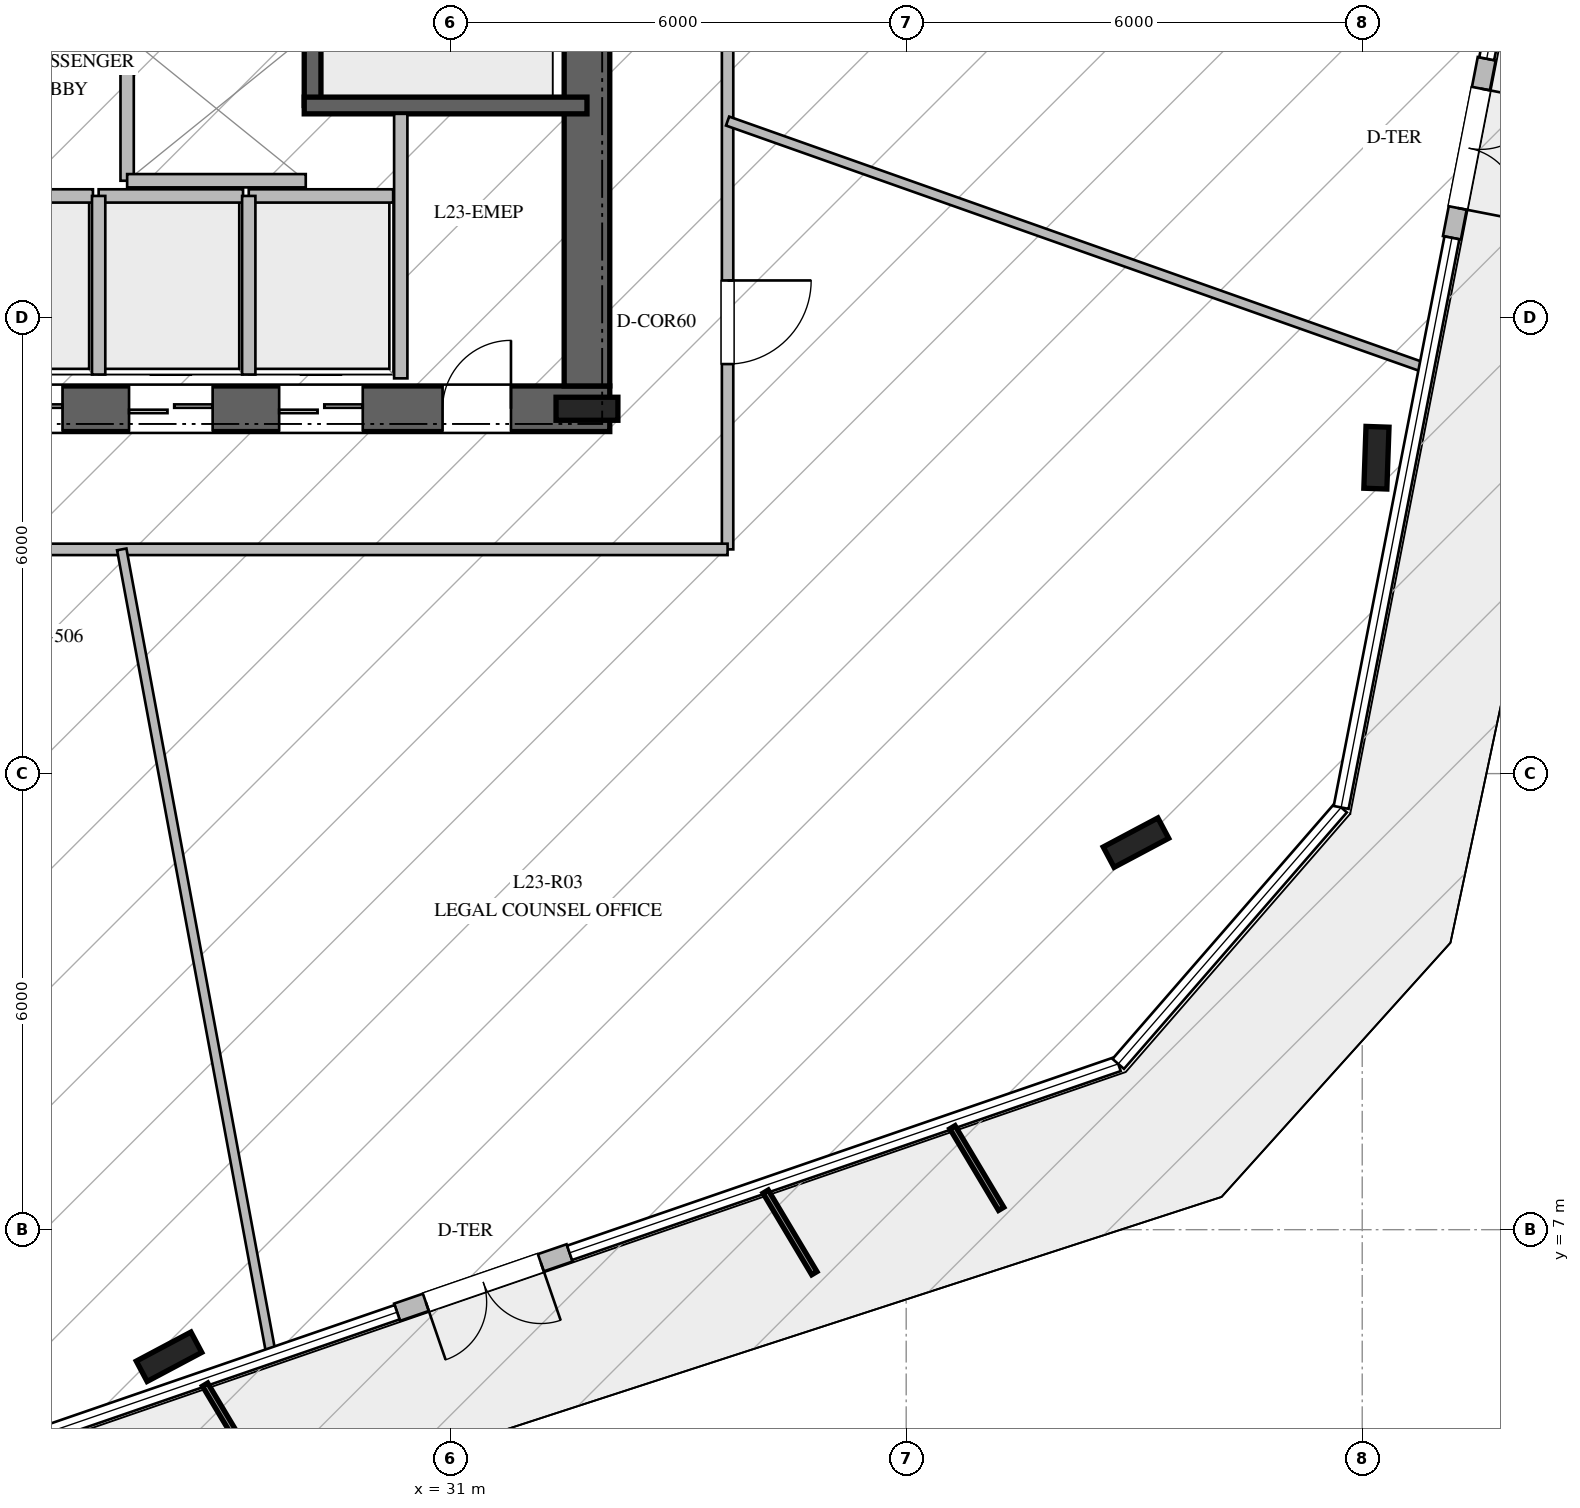
"""IFC4 building model, lengths in metres.
Left out: names, types, materials, properties, quantities, classifications, styles, units other than length and angle.
Written with IfcOpenShell. Run it as: python <this file> out.ifc"""

import sys

from ifc_helpers import new_model, si_unit, direction, frame, frame_2d, origin, origin_2d, place, context, subcontext, project, spatial, rectangle, i_section, extrude, element, fill, save


model = new_model("IFC4")
c1 = context("Model", 3, precision=1e-05, world=origin(), true_north=direction((0.0, 1.0)))
c2 = subcontext(c1, "Body", "Model", "MODEL_VIEW")
j1 = project(units=[si_unit("LENGTHUNIT", "METRE"), si_unit("PLANEANGLEUNIT", "RADIAN")], contexts=[c1])
p1 = place(None, origin())
s1 = spatial("IfcSite", under=j1, at=p1, CompositionType="ELEMENT")
p2 = place(p1, origin())
s2 = spatial("IfcBuilding", under=s1, at=p2, CompositionType="ELEMENT")
p3 = place(p2, frame((0.0, 0.0, 97.4)))
s3 = spatial("IfcBuildingStorey", under=s2, at=p3, CompositionType="ELEMENT", Elevation=97.4)
p4 = place(p3, frame((16.9, 17.8, 0.0), z_axis=(0.0, 0.0, 1.0), x_axis=(1.0, 0.0, 0.0)))
e1 = element("IfcWall", 1, at=p4, inside=s3, PredefinedType="SHEAR", context=c2, shape_type="SweptSolid", body=[
    extrude(rectangle(XDim=16.2, YDim=0.6, at=frame_2d((8.1, 0.0))), origin(), (0.0, 0.0, 1.0), 4.76),
])
p5 = place(p4, frame((5.05, 0.0, 0.0)))
e2 = element("IfcOpeningElement", 2, at=p5, cuts=e1, PredefinedType="OPENING", context=c2, shape_type="SweptSolid", body=[
    extrude(rectangle(XDim=1.2, YDim=2.25, at=frame_2d((0.6, 1.125))), frame((0.0, 0.31, 0.0), z_axis=(0.0, -1.0, 0.0), x_axis=(1.0, 0.0, 0.0)), (0.0, 0.0, 1.0), 0.62),
])
p6 = place(p4, frame((14.0, 0.0, 0.0)))
e3 = element("IfcOpeningElement", 3, at=p6, cuts=e1, PredefinedType="OPENING", context=c2, shape_type="SweptSolid", body=[
    extrude(rectangle(XDim=0.9, YDim=2.1, at=frame_2d((0.45, 1.05))), frame((0.0, 0.31, 0.0), z_axis=(0.0, -1.0, 0.0), x_axis=(1.0, 0.0, 0.0)), (0.0, 0.0, 1.0), 0.62),
])
p7 = place(p4, frame((7.9, 0.0, 0.0)))
e4 = element("IfcOpeningElement", 4, at=p7, cuts=e1, PredefinedType="OPENING", context=c2, shape_type="SweptSolid", body=[
    extrude(rectangle(XDim=1.1, YDim=2.2, at=frame_2d((0.55, 1.1))), frame((0.0, 0.31, 0.0), z_axis=(0.0, -1.0, 0.0), x_axis=(1.0, 0.0, 0.0)), (0.0, 0.0, 1.0), 0.62),
])
p8 = place(p4, frame((9.875, 0.0, 0.0)))
e5 = element("IfcOpeningElement", 5, at=p8, cuts=e1, PredefinedType="OPENING", context=c2, shape_type="SweptSolid", body=[
    extrude(rectangle(XDim=1.1, YDim=2.2, at=frame_2d((0.55, 1.1))), frame((0.0, 0.31, 0.0), z_axis=(0.0, -1.0, 0.0), x_axis=(1.0, 0.0, 0.0)), (0.0, 0.0, 1.0), 0.62),
])
p9 = place(p4, frame((11.85, 0.0, 0.0)))
e6 = element("IfcOpeningElement", 6, at=p9, cuts=e1, PredefinedType="OPENING", context=c2, shape_type="SweptSolid", body=[
    extrude(rectangle(XDim=1.1, YDim=2.2, at=frame_2d((0.55, 1.1))), frame((0.0, 0.31, 0.0), z_axis=(0.0, -1.0, 0.0), x_axis=(1.0, 0.0, 0.0)), (0.0, 0.0, 1.0), 0.62),
])
p10 = place(p3, frame((32.8, 18.1, 0.0), z_axis=(0.0, 0.0, 1.0), x_axis=(0.0, 1.0, 0.0)))
e7 = element("IfcWall", 7, at=p10, inside=s3, PredefinedType="SHEAR", context=c2, shape_type="SweptSolid", body=[
    extrude(rectangle(XDim=13.8, YDim=0.6, at=frame_2d((6.9, 0.0))), origin(), (0.0, 0.0, 1.0), 4.76),
])
p11 = place(p3, frame((32.8, 17.8, 0.0), z_axis=(0.0, 0.0, 1.0), x_axis=(1.0, 0.0, 0.0)))
e8 = element("IfcColumn", 8, at=p11, inside=s3, PredefinedType="COLUMN", context=c2, shape_type="SweptSolid", body=[
    extrude(i_section(OverallWidth=0.303, OverallDepth=0.814, WebThickness=0.021, FlangeThickness=0.04, at=origin_2d()), origin(), (0.0, 0.0, 1.0), 5.0),
])
p12 = place(p3, frame((29.19, 21.79, 0.0), z_axis=(0.0, 0.0, 1.0), x_axis=(0.0, 1.0, 0.0)))
e9 = element("IfcWall", 9, at=p12, inside=s3, PredefinedType="SOLIDWALL", context=c2, shape_type="SweptSolid", body=[
    extrude(rectangle(XDim=7.22, YDim=0.22, at=frame_2d((3.61, 0.0))), origin(), (0.0, 0.0, 1.0), 4.76),
])
p13 = place(p12, frame((5.88, 0.0, 0.0)))
e10 = element("IfcOpeningElement", 10, at=p13, cuts=e9, PredefinedType="OPENING", context=c2, shape_type="SweptSolid", body=[
    extrude(rectangle(XDim=1.15, YDim=2.2, at=frame_2d((0.575, 1.1))), frame((0.0, 0.12, 0.0), z_axis=(0.0, -1.0, 0.0), x_axis=(1.0, 0.0, 0.0)), (0.0, 0.0, 1.0), 0.24),
])
p14 = place(p3, frame((29.08, 21.79, 0.0), z_axis=(0.0, 0.0, 1.0), x_axis=(1.0, 0.0, 0.0)))
e11 = element("IfcWall", 11, at=p14, inside=s3, PredefinedType="SOLIDWALL", context=c2, shape_type="SweptSolid", body=[
    extrude(rectangle(XDim=3.72, YDim=0.22, at=frame_2d((1.86, 0.0))), origin(), (0.0, 0.0, 1.0), 4.76),
])
for number, where, z_axis, x_axis in (
    (12, (27.301, 5.328, -0.27), (0.0, 0.0, 1.0), (0.883, 0.469, 0.0)),
    (13, (40.023, 12.092, -0.27), (0.0, 0.0, 1.0), (0.883, 0.469, 0.0)),
    (14, (43.187, 17.156, -0.27), (0.0, 0.0, 1.0), (0.035, 0.999, 0.0)),
):
    element("IfcColumn", number, at=place(p3, frame(where, z_axis=z_axis, x_axis=x_axis)), inside=s3, PredefinedType="COLUMN", context=c2, shape_type="SweptSolid", body=[
        extrude(i_section(OverallWidth=0.303, OverallDepth=0.814, WebThickness=0.021, FlangeThickness=0.04, at=origin_2d()), origin(), (0.0, 0.0, 1.0), 5.27),
    ])
p15 = place(p3, frame((30.302, 5.914, 0.0), z_axis=(0.0, 0.0, 1.0), x_axis=(0.945555551181, 0.325460749755, 0.0)))
e15 = element("IfcWall", 15, at=p15, inside=s3, PredefinedType="STANDARD", context=c2, shape_type="SweptSolid", body=[
    extrude(rectangle(XDim=2.4, YDim=0.24, at=frame_2d((1.2, 0.0))), origin(), (0.0, 0.0, 1.0), 4.76),
])
p16 = place(p15, frame((0.4, 0.0, 0.0)))
e16 = element("IfcOpeningElement", 16, at=p16, cuts=e15, PredefinedType="OPENING", context=c2, shape_type="SweptSolid", body=[
    extrude(rectangle(XDim=1.6, YDim=2.25, at=frame_2d((0.8, 1.125))), frame((0.0, 0.13, 0.0), z_axis=(0.0, -1.0, 0.0), x_axis=(1.0, 0.0, 0.0)), (0.0, 0.0, 1.0), 0.26),
])
p17 = place(p3, frame((44.18, 20.049, 0.0), z_axis=(0.0, 0.0, 1.0), x_axis=(0.190831541356, 0.981622800685, 0.0)))
e17 = element("IfcWall", 17, at=p17, inside=s3, PredefinedType="STANDARD", context=c2, shape_type="SweptSolid", body=[
    extrude(rectangle(XDim=2.4, YDim=0.24, at=frame_2d((1.2, 0.0))), origin(), (0.0, 0.0, 1.0), 4.76),
])
p18 = place(p17, frame((0.4, 0.0, 0.0)))
e18 = element("IfcOpeningElement", 18, at=p18, cuts=e17, PredefinedType="OPENING", context=c2, shape_type="SweptSolid", body=[
    extrude(rectangle(XDim=1.6, YDim=2.25, at=frame_2d((0.8, 1.125))), frame((0.0, 0.13, 0.0), z_axis=(0.0, -1.0, 0.0), x_axis=(1.0, 0.0, 0.0)), (0.0, 0.0, 1.0), 0.26),
])
p19 = place(p3, frame((30.35, 18.2, 0.0), z_axis=(0.0, 0.0, 1.0), x_axis=(0.0, 1.0, 0.0)))
e19 = element("IfcWall", 19, at=p19, inside=s3, PredefinedType="PARTITIONING", context=c2, shape_type="SweptSolid", body=[
    extrude(rectangle(XDim=3.48, YDim=0.175, at=frame_2d((1.74, 0.0))), origin(), (0.0, 0.0, 1.0), 4.76),
])
p20 = place(p3, frame((24.4, 20.6, 0.0), z_axis=(0.0, 0.0, 1.0), x_axis=(1.0, 0.0, 0.0)))
e20 = element("IfcWall", 20, at=p20, inside=s3, PredefinedType="PARTITIONING", context=c2, shape_type="SweptSolid", body=[
    extrude(rectangle(XDim=1.9, YDim=0.175, at=frame_2d((0.95, 0.0))), origin(), (0.0, 0.0, 1.0), 4.76),
])
p21 = place(p3, frame((26.375, 20.6, 0.0), z_axis=(0.0, 0.0, 1.0), x_axis=(1.0, 0.0, 0.0)))
e21 = element("IfcWall", 21, at=p21, inside=s3, PredefinedType="PARTITIONING", context=c2, shape_type="SweptSolid", body=[
    extrude(rectangle(XDim=1.9, YDim=0.175, at=frame_2d((0.95, 0.0))), origin(), (0.0, 0.0, 1.0), 4.76),
])
p22 = place(p3, frame((26.375, 18.25, 0.0), z_axis=(0.0, 0.0, 1.0), x_axis=(0.0, 1.0, 0.0)))
e22 = element("IfcWall", 22, at=p22, inside=s3, PredefinedType="PARTITIONING", context=c2, shape_type="SweptSolid", body=[
    extrude(rectangle(XDim=2.35, YDim=0.175, at=frame_2d((1.175, 0.0))), origin(), (0.0, 0.0, 1.0), 4.76),
])
p23 = place(p3, frame((28.35, 20.6, 0.0), z_axis=(0.0, 0.0, 1.0), x_axis=(1.0, 0.0, 0.0)))
e23 = element("IfcWall", 23, at=p23, inside=s3, PredefinedType="PARTITIONING", context=c2, shape_type="SweptSolid", body=[
    extrude(rectangle(XDim=1.9, YDim=0.175, at=frame_2d((0.95, 0.0))), origin(), (0.0, 0.0, 1.0), 4.76),
])
p24 = place(p3, frame((28.35, 18.25, 0.0), z_axis=(0.0, 0.0, 1.0), x_axis=(0.0, 1.0, 0.0)))
e24 = element("IfcWall", 24, at=p24, inside=s3, PredefinedType="PARTITIONING", context=c2, shape_type="SweptSolid", body=[
    extrude(rectangle(XDim=2.35, YDim=0.175, at=frame_2d((1.175, 0.0))), origin(), (0.0, 0.0, 1.0), 4.76),
])
p25 = place(p3, frame((26.75, 20.8, 0.0), z_axis=(0.0, 0.0, 1.0), x_axis=(0.0, 1.0, 0.0)))
e25 = element("IfcWall", 25, at=p25, inside=s3, PredefinedType="PARTITIONING", context=c2, shape_type="SweptSolid", body=[
    extrude(rectangle(XDim=1.9, YDim=0.175, at=frame_2d((0.95, 0.0))), origin(), (0.0, 0.0, 1.0), 4.76),
])
p26 = place(p3, frame((26.75, 20.8, 0.0), z_axis=(0.0, 0.0, 1.0), x_axis=(1.0, 0.0, 0.0)))
e26 = element("IfcWall", 26, at=p26, inside=s3, PredefinedType="PARTITIONING", context=c2, shape_type="SweptSolid", body=[
    extrude(rectangle(XDim=2.35, YDim=0.175, at=frame_2d((1.175, 0.0))), origin(), (0.0, 0.0, 1.0), 4.76),
])
p27 = place(p3, frame((34.65, 34.05, 0.0), z_axis=(0.0, 0.0, 1.0), x_axis=(0.0, -1.0, 0.0)))
e27 = element("IfcWall", 27, at=p27, inside=s3, PredefinedType="PARTITIONING", context=c2, shape_type="SweptSolid", body=[
    extrude(rectangle(XDim=18.1, YDim=0.15, at=frame_2d((9.05, 0.0))), origin(), (0.0, 0.0, 1.0), 4.21),
])
p28 = place(p27, frame((14.562, 0.0, 0.0)))
e28 = element("IfcOpeningElement", 28, at=p28, cuts=e27, PredefinedType="OPENING", context=c2, shape_type="SweptSolid", body=[
    extrude(rectangle(XDim=1.1, YDim=2.2, at=frame_2d((0.55, 1.1))), frame((0.0, 0.085, 0.0), z_axis=(0.0, -1.0, 0.0), x_axis=(1.0, 0.0, 0.0)), (0.0, 0.0, 1.0), 0.17),
])
p29 = place(p27, frame((7.872, 0.0, 0.0)))
e29 = element("IfcOpeningElement", 29, at=p29, cuts=e27, PredefinedType="OPENING", context=c2, shape_type="SweptSolid", body=[
    extrude(rectangle(XDim=1.1, YDim=2.2, at=frame_2d((0.55, 1.1))), frame((0.0, 0.085, 0.0), z_axis=(0.0, -1.0, 0.0), x_axis=(1.0, 0.0, 0.0)), (0.0, 0.0, 1.0), 0.17),
])
p30 = place(p3, frame((34.65, 15.95, 0.0), z_axis=(0.0, 0.0, 1.0), x_axis=(-1.0, 0.0, 0.0)))
e30 = element("IfcWall", 30, at=p30, inside=s3, PredefinedType="PARTITIONING", context=c2, shape_type="SweptSolid", body=[
    extrude(rectangle(XDim=19.3, YDim=0.15, at=frame_2d((9.65, 0.0))), origin(), (0.0, 0.0, 1.0), 4.21),
])
p31 = place(p30, frame((12.227, 0.0, 0.0)))
e31 = element("IfcOpeningElement", 31, at=p31, cuts=e30, PredefinedType="OPENING", context=c2, shape_type="SweptSolid", body=[
    extrude(rectangle(XDim=1.1, YDim=2.2, at=frame_2d((0.55, 1.1))), frame((0.0, 0.085, 0.0), z_axis=(0.0, -1.0, 0.0), x_axis=(1.0, 0.0, 0.0)), (0.0, 0.0, 1.0), 0.17),
])
p32 = place(p3, frame((26.679, 15.95, 0.0), z_axis=(0.0, 0.0, 1.0), x_axis=(0.182465094044, -0.983212331826, 0.0)))
e32 = element("IfcWall", 32, at=p32, inside=s3, PredefinedType="PARTITIONING", context=c2, shape_type="SweptSolid", body=[
    extrude(rectangle(XDim=10.77, YDim=0.125, at=frame_2d((5.385, 0.0))), origin(), (0.0, 0.0, 1.0), 4.16),
])
p33 = place(p3, frame((34.65, 21.585, 0.0), z_axis=(0.0, 0.0, 1.0), x_axis=(0.94273270397, -0.333549170087, 0.0)))
e33 = element("IfcWall", 33, at=p33, inside=s3, PredefinedType="PARTITIONING", context=c2, shape_type="SweptSolid", body=[
    extrude(rectangle(XDim=9.738, YDim=0.125, at=frame_2d((4.869, 0.0))), origin(), (0.0, 0.0, 1.0), 4.16),
])
p34 = place(p16, frame((1.6, 0.0, 0.0), z_axis=(0.0, 0.0, 1.0), x_axis=(-1.0, 0.0, 0.0)))
e34 = element("IfcDoor", 34, at=p34, inside=s3, OperationType="DOUBLE_DOOR_SINGLE_SWING", PredefinedType="DOOR", context=c2, shape_type="SweptSolid", body=[
    extrude(rectangle(XDim=1.6, YDim=2.25, at=frame_2d((0.8, 1.125))), frame((0.0, 0.025, 0.0), z_axis=(0.0, -1.0, 0.0), x_axis=(1.0, 0.0, 0.0)), (0.0, 0.0, 1.0), 0.05),
])
fill(e16, e34)
p35 = place(p18, frame((1.6, 0.0, 0.0), z_axis=(0.0, 0.0, 1.0), x_axis=(-1.0, 0.0, 0.0)))
e35 = element("IfcDoor", 35, at=p35, inside=s3, OperationType="DOUBLE_DOOR_SINGLE_SWING", PredefinedType="DOOR", context=c2, shape_type="SweptSolid", body=[
    extrude(rectangle(XDim=1.6, YDim=2.25, at=frame_2d((0.8, 1.125))), frame((0.0, 0.025, 0.0), z_axis=(0.0, -1.0, 0.0), x_axis=(1.0, 0.0, 0.0)), (0.0, 0.0, 1.0), 0.05),
])
fill(e18, e35)
p36 = place(p6, origin())
e36 = element("IfcDoor", 36, at=p36, inside=s3, OperationType="SINGLE_SWING_RIGHT", PredefinedType="DOOR", context=c2, shape_type="SweptSolid", body=[
    extrude(rectangle(XDim=0.9, YDim=2.1, at=frame_2d((0.45, 1.05))), frame((0.0, 0.025, 0.0), z_axis=(0.0, -1.0, 0.0), x_axis=(1.0, 0.0, 0.0)), (0.0, 0.0, 1.0), 0.05),
])
fill(e3, e36)
p37 = place(p7, origin())
e37 = element("IfcDoor", 37, at=p37, inside=s3, OperationType="DOUBLE_DOOR_SLIDING", PredefinedType="DOOR", context=c2, shape_type="SweptSolid", body=[
    extrude(rectangle(XDim=1.1, YDim=2.2, at=frame_2d((0.55, 1.1))), frame((0.0, 0.025, 0.0), z_axis=(0.0, -1.0, 0.0), x_axis=(1.0, 0.0, 0.0)), (0.0, 0.0, 1.0), 0.05),
])
fill(e4, e37)
p38 = place(p8, origin())
e38 = element("IfcDoor", 38, at=p38, inside=s3, OperationType="DOUBLE_DOOR_SLIDING", PredefinedType="DOOR", context=c2, shape_type="SweptSolid", body=[
    extrude(rectangle(XDim=1.1, YDim=2.2, at=frame_2d((0.55, 1.1))), frame((0.0, 0.025, 0.0), z_axis=(0.0, -1.0, 0.0), x_axis=(1.0, 0.0, 0.0)), (0.0, 0.0, 1.0), 0.05),
])
fill(e5, e38)
p39 = place(p9, origin())
e39 = element("IfcDoor", 39, at=p39, inside=s3, OperationType="DOUBLE_DOOR_SLIDING", PredefinedType="DOOR", context=c2, shape_type="SweptSolid", body=[
    extrude(rectangle(XDim=1.1, YDim=2.2, at=frame_2d((0.55, 1.1))), frame((0.0, 0.025, 0.0), z_axis=(0.0, -1.0, 0.0), x_axis=(1.0, 0.0, 0.0)), (0.0, 0.0, 1.0), 0.05),
])
fill(e6, e39)
p40 = place(p28, origin())
e40 = element("IfcDoor", 40, at=p40, inside=s3, OperationType="SINGLE_SWING_LEFT", PredefinedType="DOOR", context=c2, shape_type="SweptSolid", body=[
    extrude(rectangle(XDim=1.1, YDim=2.2, at=frame_2d((0.55, 1.1))), frame((0.0, 0.025, 0.0), z_axis=(0.0, -1.0, 0.0), x_axis=(1.0, 0.0, 0.0)), (0.0, 0.0, 1.0), 0.05),
])
fill(e28, e40)
save(model, sys.argv[1])
